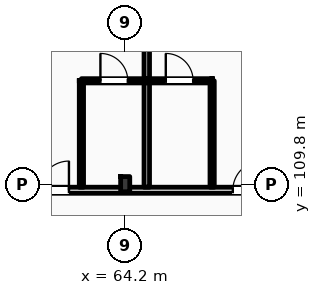
"""IFC4 building model, lengths in metres.
Left out: names, types, materials, properties, quantities, classifications, styles, units other than length and angle.
Written with IfcOpenShell. Run it as: python <this file> out.ifc"""

import sys

from ifc_helpers import new_model, si_unit, direction, frame, frame_2d, origin, origin_2d, place, context, subcontext, project, spatial, rectangle, i_section, extrude, element, fill, save


model = new_model("IFC4")
c1 = context("Model", 3, precision=1e-05, world=origin(), true_north=direction((0.0, 1.0)))
c2 = subcontext(c1, "Body", "Model", "MODEL_VIEW")
j1 = project(units=[si_unit("LENGTHUNIT", "METRE"), si_unit("PLANEANGLEUNIT", "RADIAN")], contexts=[c1])
p1 = place(None, origin())
s1 = spatial("IfcSite", under=j1, at=p1, CompositionType="ELEMENT")
p2 = place(p1, origin())
s2 = spatial("IfcBuilding", under=s1, at=p2, CompositionType="ELEMENT")
p3 = place(p2, frame((0.0, 0.0, 24.6)))
s3 = spatial("IfcBuildingStorey", under=s2, at=p3, CompositionType="ELEMENT", Elevation=24.6)
p4 = place(p3, frame((64.2, 109.8, 0.0), z_axis=(0.0, 0.0, 1.0), x_axis=(1.0, 0.0, 0.0)))
e1 = element("IfcColumn", 1, at=p4, inside=s3, PredefinedType="COLUMN", context=c2, shape_type="SweptSolid", body=[
    extrude(i_section(OverallWidth=0.3, OverallDepth=0.5, WebThickness=0.014, FlangeThickness=0.028, FilletRadius=0.027, at=origin_2d()), origin(), (0.0, 0.0, 1.0), 3.6),
])
p5 = place(p3, frame((10.65, 109.6, 0.0), z_axis=(0.0, 0.0, 1.0), x_axis=(1.0, 0.0, 0.0)))
e2 = element("IfcWall", 2, at=p5, inside=s3, PredefinedType="PARTITIONING", context=c2, shape_type="SweptSolid", body=[
    extrude(rectangle(XDim=109.21, YDim=0.2, at=frame_2d((54.605, 0.0))), origin(), (0.0, 0.0, 1.0), 2.78),
])
p6 = place(p5, frame((12.705, 0.0, 0.0)))
e3 = element("IfcOpeningElement", 3, at=p6, cuts=e2, PredefinedType="OPENING", context=c2, shape_type="SweptSolid", body=[
    extrude(rectangle(XDim=1.02, YDim=2.2, at=frame_2d((0.51, 1.1))), frame((0.0, 0.11, 0.0), z_axis=(0.0, -1.0, 0.0), x_axis=(1.0, 0.0, 0.0)), (0.0, 0.0, 1.0), 0.22),
])
p7 = place(p5, frame((19.26, 0.0, 0.0)))
e4 = element("IfcOpeningElement", 4, at=p7, cuts=e2, PredefinedType="OPENING", context=c2, shape_type="SweptSolid", body=[
    extrude(rectangle(XDim=1.02, YDim=2.2, at=frame_2d((0.51, 1.1))), frame((0.0, 0.11, 0.0), z_axis=(0.0, -1.0, 0.0), x_axis=(1.0, 0.0, 0.0)), (0.0, 0.0, 1.0), 0.22),
])
p8 = place(p5, frame((23.71, 0.0, 0.0)))
e5 = element("IfcOpeningElement", 5, at=p8, cuts=e2, PredefinedType="OPENING", context=c2, shape_type="SweptSolid", body=[
    extrude(rectangle(XDim=1.02, YDim=2.2, at=frame_2d((0.51, 1.1))), frame((0.0, 0.11, 0.0), z_axis=(0.0, -1.0, 0.0), x_axis=(1.0, 0.0, 0.0)), (0.0, 0.0, 1.0), 0.22),
])
p9 = place(p5, frame((27.66, 0.0, 0.0)))
e6 = element("IfcOpeningElement", 6, at=p9, cuts=e2, PredefinedType="OPENING", context=c2, shape_type="SweptSolid", body=[
    extrude(rectangle(XDim=1.02, YDim=2.2, at=frame_2d((0.51, 1.1))), frame((0.0, 0.11, 0.0), z_axis=(0.0, -1.0, 0.0), x_axis=(1.0, 0.0, 0.0)), (0.0, 0.0, 1.0), 0.22),
])
p10 = place(p5, frame((31.89, 0.0, 0.0)))
e7 = element("IfcOpeningElement", 7, at=p10, cuts=e2, PredefinedType="OPENING", context=c2, shape_type="SweptSolid", body=[
    extrude(rectangle(XDim=0.96, YDim=2.2, at=frame_2d((0.48, 1.1))), frame((0.0, 0.11, 0.0), z_axis=(0.0, -1.0, 0.0), x_axis=(1.0, 0.0, 0.0)), (0.0, 0.0, 1.0), 0.22),
])
p11 = place(p5, frame((33.94, 0.0, 0.0)))
e8 = element("IfcOpeningElement", 8, at=p11, cuts=e2, PredefinedType="OPENING", context=c2, shape_type="SweptSolid", body=[
    extrude(rectangle(XDim=0.96, YDim=2.2, at=frame_2d((0.48, 1.1))), frame((0.0, 0.11, 0.0), z_axis=(0.0, -1.0, 0.0), x_axis=(1.0, 0.0, 0.0)), (0.0, 0.0, 1.0), 0.22),
])
p12 = place(p5, frame((40.29, 0.0, 0.0)))
e9 = element("IfcOpeningElement", 9, at=p12, cuts=e2, PredefinedType="OPENING", context=c2, shape_type="SweptSolid", body=[
    extrude(rectangle(XDim=0.96, YDim=2.2, at=frame_2d((0.48, 1.1))), frame((0.0, 0.11, 0.0), z_axis=(0.0, -1.0, 0.0), x_axis=(1.0, 0.0, 0.0)), (0.0, 0.0, 1.0), 0.22),
])
p13 = place(p5, frame((42.34, 0.0, 0.0)))
e10 = element("IfcOpeningElement", 10, at=p13, cuts=e2, PredefinedType="OPENING", context=c2, shape_type="SweptSolid", body=[
    extrude(rectangle(XDim=0.96, YDim=2.2, at=frame_2d((0.48, 1.1))), frame((0.0, 0.11, 0.0), z_axis=(0.0, -1.0, 0.0), x_axis=(1.0, 0.0, 0.0)), (0.0, 0.0, 1.0), 0.22),
])
p14 = place(p5, frame((48.69, 0.0, 0.0)))
e11 = element("IfcOpeningElement", 11, at=p14, cuts=e2, PredefinedType="OPENING", context=c2, shape_type="SweptSolid", body=[
    extrude(rectangle(XDim=0.96, YDim=2.2, at=frame_2d((0.48, 1.1))), frame((0.0, 0.11, 0.0), z_axis=(0.0, -1.0, 0.0), x_axis=(1.0, 0.0, 0.0)), (0.0, 0.0, 1.0), 0.22),
])
p15 = place(p5, frame((50.74, 0.0, 0.0)))
e12 = element("IfcOpeningElement", 12, at=p15, cuts=e2, PredefinedType="OPENING", context=c2, shape_type="SweptSolid", body=[
    extrude(rectangle(XDim=0.96, YDim=2.2, at=frame_2d((0.48, 1.1))), frame((0.0, 0.11, 0.0), z_axis=(0.0, -1.0, 0.0), x_axis=(1.0, 0.0, 0.0)), (0.0, 0.0, 1.0), 0.22),
])
p16 = place(p5, frame((57.09, 0.0, 0.0)))
e13 = element("IfcOpeningElement", 13, at=p16, cuts=e2, PredefinedType="OPENING", context=c2, shape_type="SweptSolid", body=[
    extrude(rectangle(XDim=0.96, YDim=2.2, at=frame_2d((0.48, 1.1))), frame((0.0, 0.11, 0.0), z_axis=(0.0, -1.0, 0.0), x_axis=(1.0, 0.0, 0.0)), (0.0, 0.0, 1.0), 0.22),
])
p17 = place(p5, frame((59.14, 0.0, 0.0)))
e14 = element("IfcOpeningElement", 14, at=p17, cuts=e2, PredefinedType="OPENING", context=c2, shape_type="SweptSolid", body=[
    extrude(rectangle(XDim=0.96, YDim=2.2, at=frame_2d((0.48, 1.1))), frame((0.0, 0.11, 0.0), z_axis=(0.0, -1.0, 0.0), x_axis=(1.0, 0.0, 0.0)), (0.0, 0.0, 1.0), 0.22),
])
p18 = place(p5, frame((65.49, 0.0, 0.0)))
e15 = element("IfcOpeningElement", 15, at=p18, cuts=e2, PredefinedType="OPENING", context=c2, shape_type="SweptSolid", body=[
    extrude(rectangle(XDim=0.96, YDim=2.2, at=frame_2d((0.48, 1.1))), frame((0.0, 0.11, 0.0), z_axis=(0.0, -1.0, 0.0), x_axis=(1.0, 0.0, 0.0)), (0.0, 0.0, 1.0), 0.22),
])
p19 = place(p5, frame((67.54, 0.0, 0.0)))
e16 = element("IfcOpeningElement", 16, at=p19, cuts=e2, PredefinedType="OPENING", context=c2, shape_type="SweptSolid", body=[
    extrude(rectangle(XDim=0.96, YDim=2.2, at=frame_2d((0.48, 1.1))), frame((0.0, 0.11, 0.0), z_axis=(0.0, -1.0, 0.0), x_axis=(1.0, 0.0, 0.0)), (0.0, 0.0, 1.0), 0.22),
])
p20 = place(p5, frame((73.89, 0.0, 0.0)))
e17 = element("IfcOpeningElement", 17, at=p20, cuts=e2, PredefinedType="OPENING", context=c2, shape_type="SweptSolid", body=[
    extrude(rectangle(XDim=0.96, YDim=2.2, at=frame_2d((0.48, 1.1))), frame((0.0, 0.11, 0.0), z_axis=(0.0, -1.0, 0.0), x_axis=(1.0, 0.0, 0.0)), (0.0, 0.0, 1.0), 0.22),
])
p21 = place(p5, frame((78.09, 0.0, 0.0)))
e18 = element("IfcOpeningElement", 18, at=p21, cuts=e2, PredefinedType="OPENING", context=c2, shape_type="SweptSolid", body=[
    extrude(rectangle(XDim=0.96, YDim=2.2, at=frame_2d((0.48, 1.1))), frame((0.0, 0.11, 0.0), z_axis=(0.0, -1.0, 0.0), x_axis=(1.0, 0.0, 0.0)), (0.0, 0.0, 1.0), 0.22),
])
p22 = place(p5, frame((82.29, 0.0, 0.0)))
e19 = element("IfcOpeningElement", 19, at=p22, cuts=e2, PredefinedType="OPENING", context=c2, shape_type="SweptSolid", body=[
    extrude(rectangle(XDim=0.96, YDim=2.2, at=frame_2d((0.48, 1.1))), frame((0.0, 0.11, 0.0), z_axis=(0.0, -1.0, 0.0), x_axis=(1.0, 0.0, 0.0)), (0.0, 0.0, 1.0), 0.22),
])
p23 = place(p5, frame((86.49, 0.0, 0.0)))
e20 = element("IfcOpeningElement", 20, at=p23, cuts=e2, PredefinedType="OPENING", context=c2, shape_type="SweptSolid", body=[
    extrude(rectangle(XDim=0.96, YDim=2.2, at=frame_2d((0.48, 1.1))), frame((0.0, 0.11, 0.0), z_axis=(0.0, -1.0, 0.0), x_axis=(1.0, 0.0, 0.0)), (0.0, 0.0, 1.0), 0.22),
])
p24 = place(p5, frame((88.54, 0.0, 0.0)))
e21 = element("IfcOpeningElement", 21, at=p24, cuts=e2, PredefinedType="OPENING", context=c2, shape_type="SweptSolid", body=[
    extrude(rectangle(XDim=0.96, YDim=2.2, at=frame_2d((0.48, 1.1))), frame((0.0, 0.11, 0.0), z_axis=(0.0, -1.0, 0.0), x_axis=(1.0, 0.0, 0.0)), (0.0, 0.0, 1.0), 0.22),
])
p25 = place(p5, frame((94.89, 0.0, 0.0)))
e22 = element("IfcOpeningElement", 22, at=p25, cuts=e2, PredefinedType="OPENING", context=c2, shape_type="SweptSolid", body=[
    extrude(rectangle(XDim=0.96, YDim=2.2, at=frame_2d((0.48, 1.1))), frame((0.0, 0.11, 0.0), z_axis=(0.0, -1.0, 0.0), x_axis=(1.0, 0.0, 0.0)), (0.0, 0.0, 1.0), 0.22),
])
p26 = place(p5, frame((96.94, 0.0, 0.0)))
e23 = element("IfcOpeningElement", 23, at=p26, cuts=e2, PredefinedType="OPENING", context=c2, shape_type="SweptSolid", body=[
    extrude(rectangle(XDim=0.96, YDim=2.2, at=frame_2d((0.48, 1.1))), frame((0.0, 0.11, 0.0), z_axis=(0.0, -1.0, 0.0), x_axis=(1.0, 0.0, 0.0)), (0.0, 0.0, 1.0), 0.22),
])
p27 = place(p5, frame((103.29, 0.0, 0.0)))
e24 = element("IfcOpeningElement", 24, at=p27, cuts=e2, PredefinedType="OPENING", context=c2, shape_type="SweptSolid", body=[
    extrude(rectangle(XDim=0.96, YDim=2.2, at=frame_2d((0.48, 1.1))), frame((0.0, 0.11, 0.0), z_axis=(0.0, -1.0, 0.0), x_axis=(1.0, 0.0, 0.0)), (0.0, 0.0, 1.0), 0.22),
])
p28 = place(p5, frame((105.25, 0.0, 0.0)))
e25 = element("IfcOpeningElement", 25, at=p28, cuts=e2, PredefinedType="OPENING", context=c2, shape_type="SweptSolid", body=[
    extrude(rectangle(XDim=0.96, YDim=2.2, at=frame_2d((0.48, 1.1))), frame((0.0, 0.11, 0.0), z_axis=(0.0, -1.0, 0.0), x_axis=(1.0, 0.0, 0.0)), (0.0, 0.0, 1.0), 0.22),
])
p29 = place(p5, frame((2.716, 0.0, 0.0)))
e26 = element("IfcOpeningElement", 26, at=p29, cuts=e2, PredefinedType="OPENING", context=c2, shape_type="SweptSolid", body=[
    extrude(rectangle(XDim=1.35, YDim=2.25, at=frame_2d((0.675, 1.125))), frame((0.0, 0.11, 0.0), z_axis=(0.0, -1.0, 0.0), x_axis=(1.0, 0.0, 0.0)), (0.0, 0.0, 1.0), 0.22),
])
p30 = place(p5, frame((6.65, 0.0, 0.0)))
e27 = element("IfcOpeningElement", 27, at=p30, cuts=e2, PredefinedType="OPENING", context=c2, shape_type="SweptSolid", body=[
    extrude(rectangle(XDim=1.35, YDim=2.25, at=frame_2d((0.675, 1.125))), frame((0.0, 0.11, 0.0), z_axis=(0.0, -1.0, 0.0), x_axis=(1.0, 0.0, 0.0)), (0.0, 0.0, 1.0), 0.22),
])
p31 = place(p5, frame((10.583, 0.0, 0.0)))
e28 = element("IfcOpeningElement", 28, at=p31, cuts=e2, PredefinedType="OPENING", context=c2, shape_type="SweptSolid", body=[
    extrude(rectangle(XDim=1.35, YDim=2.25, at=frame_2d((0.675, 1.125))), frame((0.0, 0.11, 0.0), z_axis=(0.0, -1.0, 0.0), x_axis=(1.0, 0.0, 0.0)), (0.0, 0.0, 1.0), 0.22),
])
p32 = place(p3, frame((64.91, 109.7, 0.0), z_axis=(0.0, 0.0, 1.0), x_axis=(0.0, 1.0, 0.0)))
e29 = element("IfcWall", 29, at=p32, inside=s3, PredefinedType="PARTITIONING", context=c2, shape_type="SweptSolid", body=[
    extrude(rectangle(XDim=8.15, YDim=0.18, at=frame_2d((4.075, 0.0))), origin(), (0.0, 0.0, 1.0), 3.34),
])
p33 = place(p3, frame((62.76, 109.7, 0.0), z_axis=(0.0, 0.0, 1.0), x_axis=(0.0, 1.0, 0.0)))
e30 = element("IfcWall", 30, at=p33, inside=s3, PredefinedType="PARTITIONING", context=c2, shape_type="SweptSolid", body=[
    extrude(rectangle(XDim=3.5, YDim=0.14, at=frame_2d((1.75, 0.0))), origin(), (0.0, 0.0, 1.0), 3.34),
])
p34 = place(p3, frame((62.76, 113.2, 0.0), z_axis=(0.0, 0.0, 1.0), x_axis=(1.0, 0.0, 0.0)))
e31 = element("IfcWall", 31, at=p34, inside=s3, PredefinedType="PARTITIONING", context=c2, shape_type="SweptSolid", body=[
    extrude(rectangle(XDim=2.15, YDim=0.14, at=frame_2d((1.075, 0.0))), origin(), (0.0, 0.0, 1.0), 3.34),
])
p35 = place(p34, frame((0.625, 0.0, 0.0)))
e32 = element("IfcOpeningElement", 32, at=p35, cuts=e31, PredefinedType="OPENING", context=c2, shape_type="SweptSolid", body=[
    extrude(rectangle(XDim=0.9, YDim=2.1, at=frame_2d((0.45, 1.05))), frame((0.0, 0.08, 0.0), z_axis=(0.0, -1.0, 0.0), x_axis=(1.0, 0.0, 0.0)), (0.0, 0.0, 1.0), 0.16),
])
p36 = place(p3, frame((67.06, 109.7, 0.0), z_axis=(0.0, 0.0, 1.0), x_axis=(0.0, 1.0, 0.0)))
e33 = element("IfcWall", 33, at=p36, inside=s3, PredefinedType="PARTITIONING", context=c2, shape_type="SweptSolid", body=[
    extrude(rectangle(XDim=3.5, YDim=0.14, at=frame_2d((1.75, 0.0))), origin(), (0.0, 0.0, 1.0), 3.34),
])
p37 = place(p3, frame((64.91, 113.2, 0.0), z_axis=(0.0, 0.0, 1.0), x_axis=(1.0, 0.0, 0.0)))
e34 = element("IfcWall", 34, at=p37, inside=s3, PredefinedType="PARTITIONING", context=c2, shape_type="SweptSolid", body=[
    extrude(rectangle(XDim=2.15, YDim=0.14, at=frame_2d((1.075, 0.0))), origin(), (0.0, 0.0, 1.0), 3.34),
])
p38 = place(p37, frame((0.625, 0.0, 0.0)))
e35 = element("IfcOpeningElement", 35, at=p38, cuts=e34, PredefinedType="OPENING", context=c2, shape_type="SweptSolid", body=[
    extrude(rectangle(XDim=0.9, YDim=2.1, at=frame_2d((0.45, 1.05))), frame((0.0, 0.08, 0.0), z_axis=(0.0, -1.0, 0.0), x_axis=(1.0, 0.0, 0.0)), (0.0, 0.0, 1.0), 0.16),
])
p39 = place(p15, origin())
e36 = element("IfcDoor", 36, at=p39, inside=s3, OperationType="SINGLE_SWING_RIGHT", PredefinedType="DOOR", context=c2, shape_type="SweptSolid", body=[
    extrude(rectangle(XDim=0.96, YDim=2.2, at=frame_2d((0.48, 1.1))), frame((0.0, 0.025, 0.0), z_axis=(0.0, -1.0, 0.0), x_axis=(1.0, 0.0, 0.0)), (0.0, 0.0, 1.0), 0.05),
])
fill(e12, e36)
p40 = place(p35, origin())
e37 = element("IfcDoor", 37, at=p40, inside=s3, OperationType="SINGLE_SWING_LEFT", PredefinedType="DOOR", context=c2, shape_type="SweptSolid", body=[
    extrude(rectangle(XDim=0.9, YDim=2.1, at=frame_2d((0.45, 1.05))), frame((0.0, 0.025, 0.0), z_axis=(0.0, -1.0, 0.0), x_axis=(1.0, 0.0, 0.0)), (0.0, 0.0, 1.0), 0.05),
])
fill(e32, e37)
p41 = place(p16, origin())
e38 = element("IfcDoor", 38, at=p41, inside=s3, OperationType="SINGLE_SWING_RIGHT", PredefinedType="DOOR", context=c2, shape_type="SweptSolid", body=[
    extrude(rectangle(XDim=0.96, YDim=2.2, at=frame_2d((0.48, 1.1))), frame((0.0, 0.025, 0.0), z_axis=(0.0, -1.0, 0.0), x_axis=(1.0, 0.0, 0.0)), (0.0, 0.0, 1.0), 0.05),
])
fill(e13, e38)
p42 = place(p38, origin())
e39 = element("IfcDoor", 39, at=p42, inside=s3, OperationType="SINGLE_SWING_LEFT", PredefinedType="DOOR", context=c2, shape_type="SweptSolid", body=[
    extrude(rectangle(XDim=0.9, YDim=2.1, at=frame_2d((0.45, 1.05))), frame((0.0, 0.025, 0.0), z_axis=(0.0, -1.0, 0.0), x_axis=(1.0, 0.0, 0.0)), (0.0, 0.0, 1.0), 0.05),
])
fill(e35, e39)
save(model, sys.argv[1])
